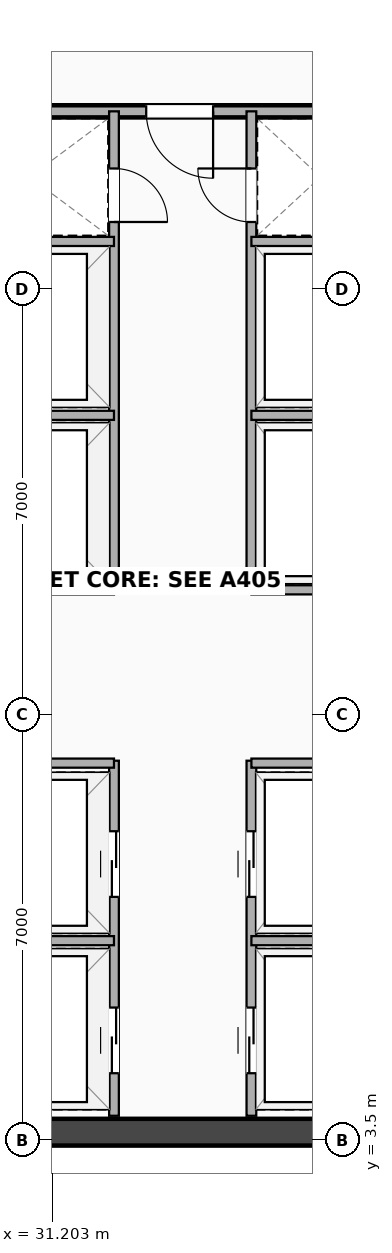
"""IFC4 building model, lengths in metres.
Left out: names, types, materials, properties, quantities, classifications, styles, units other than length and angle.
Written with IfcOpenShell. Run it as: python <this file> out.ifc"""

import sys

from ifc_helpers import new_model, si_unit, direction, frame, frame_2d, origin, place, context, subcontext, project, spatial, rectangle, extrude, element, fill, save


model = new_model("IFC4")
c1 = context("Model", 3, precision=1e-05, world=origin(), true_north=direction((0.0, 1.0)))
c2 = subcontext(c1, "Body", "Model", "MODEL_VIEW")
j1 = project(units=[si_unit("LENGTHUNIT", "METRE"), si_unit("PLANEANGLEUNIT", "RADIAN")], contexts=[c1])
p1 = place(None, origin())
s1 = spatial("IfcSite", under=j1, at=p1, CompositionType="ELEMENT")
p2 = place(p1, origin())
s2 = spatial("IfcBuilding", under=s1, at=p2, CompositionType="ELEMENT")
p3 = place(p2, frame((0.0, 0.0, 68.4)))
s3 = spatial("IfcBuildingStorey", under=s2, at=p3, CompositionType="ELEMENT", Elevation=68.4)
p4 = place(p3, frame((20.3, 3.63, 0.0), z_axis=(0.0, 0.0, 1.0), x_axis=(1.0, 0.0, 0.0)))
e1 = element("IfcWall", 1, at=p4, inside=s3, PredefinedType="SHEAR", context=c2, shape_type="SweptSolid", body=[
    extrude(rectangle(XDim=24.5, YDim=0.44, at=frame_2d((12.25, 0.0))), origin(), (0.0, 0.0, 1.0), 3.22),
])
p5 = place(p3, frame((29.2, 20.42, 0.0), z_axis=(0.0, 0.0, 1.0), x_axis=(1.0, 0.0, 0.0)))
e2 = element("IfcWall", 2, at=p5, inside=s3, PredefinedType="PARTITIONING", context=c2, shape_type="SweptSolid", body=[
    extrude(rectangle(XDim=7.8, YDim=0.2, at=frame_2d((3.9, 0.0))), origin(), (0.0, 0.0, 1.0), 2.51),
])
p6 = place(p5, frame((3.55, 0.0, 0.0)))
e3 = element("IfcOpeningElement", 3, at=p6, cuts=e2, PredefinedType="OPENING", context=c2, shape_type="SweptSolid", body=[
    extrude(rectangle(XDim=1.1, YDim=2.15, at=frame_2d((0.55, 1.075))), frame((0.0, 0.11, 0.0), z_axis=(0.0, -1.0, 0.0), x_axis=(1.0, 0.0, 0.0)), (0.0, 0.0, 1.0), 0.22),
])
p7 = place(p3, frame((32.22, 3.9, 0.0), z_axis=(0.0, 0.0, 1.0), x_axis=(0.0, 1.0, 0.0)))
e4 = element("IfcWall", 4, at=p7, inside=s3, PredefinedType="PARTITIONING", context=c2, shape_type="SweptSolid", body=[
    extrude(rectangle(XDim=5.84, YDim=0.16, at=frame_2d((2.92, 0.0))), origin(), (0.0, 0.0, 1.0), 3.22),
])
p8 = place(p7, frame((1.78, 0.0, 0.0), z_axis=(0.0, 0.0, 1.0), x_axis=(-1.0, 0.0, 0.0)))
e5 = element("IfcOpeningElement", 5, at=p8, cuts=e4, PredefinedType="OPENING", context=c2, shape_type="SweptSolid", body=[
    extrude(rectangle(XDim=1.08, YDim=2.16, at=frame_2d((0.54, 1.08))), frame((0.0, 0.09, 0.0), z_axis=(0.0, -1.0, 0.0), x_axis=(1.0, 0.0, 0.0)), (0.0, 0.0, 1.0), 0.18),
])
p9 = place(p7, frame((4.68, 0.0, 0.0), z_axis=(0.0, 0.0, 1.0), x_axis=(-1.0, 0.0, 0.0)))
e6 = element("IfcOpeningElement", 6, at=p9, cuts=e4, PredefinedType="OPENING", context=c2, shape_type="SweptSolid", body=[
    extrude(rectangle(XDim=1.08, YDim=2.16, at=frame_2d((0.54, 1.08))), frame((0.0, 0.09, 0.0), z_axis=(0.0, -1.0, 0.0), x_axis=(1.0, 0.0, 0.0)), (0.0, 0.0, 1.0), 0.18),
])
p10 = place(p3, frame((34.48, 3.9, 0.0), z_axis=(0.0, 0.0, 1.0), x_axis=(0.0, 1.0, 0.0)))
e7 = element("IfcWall", 7, at=p10, inside=s3, PredefinedType="PARTITIONING", context=c2, shape_type="SweptSolid", body=[
    extrude(rectangle(XDim=5.84, YDim=0.16, at=frame_2d((2.92, 0.0))), origin(), (0.0, 0.0, 1.0), 3.22),
])
p11 = place(p10, frame((0.7, 0.0, 0.0)))
e8 = element("IfcOpeningElement", 8, at=p11, cuts=e7, PredefinedType="OPENING", context=c2, shape_type="SweptSolid", body=[
    extrude(rectangle(XDim=1.08, YDim=2.16, at=frame_2d((0.54, 1.08))), frame((0.0, 0.09, 0.0), z_axis=(0.0, -1.0, 0.0), x_axis=(1.0, 0.0, 0.0)), (0.0, 0.0, 1.0), 0.18),
])
p12 = place(p10, frame((3.6, 0.0, 0.0)))
e9 = element("IfcOpeningElement", 9, at=p12, cuts=e7, PredefinedType="OPENING", context=c2, shape_type="SweptSolid", body=[
    extrude(rectangle(XDim=1.08, YDim=2.16, at=frame_2d((0.54, 1.08))), frame((0.0, 0.09, 0.0), z_axis=(0.0, -1.0, 0.0), x_axis=(1.0, 0.0, 0.0)), (0.0, 0.0, 1.0), 0.18),
])
p13 = place(p3, frame((29.45, 6.78, 0.0), z_axis=(0.0, 0.0, 1.0), x_axis=(1.0, 0.0, 0.0)))
e10 = element("IfcWall", 10, at=p13, inside=s3, PredefinedType="PARTITIONING", context=c2, shape_type="SweptSolid", body=[
    extrude(rectangle(XDim=2.77, YDim=0.15, at=frame_2d((1.385, 0.0))), origin(), (0.0, 0.0, 1.0), 3.22),
])
p14 = place(p3, frame((34.48, 6.78, 0.0), z_axis=(0.0, 0.0, 1.0), x_axis=(1.0, 0.0, 0.0)))
e11 = element("IfcWall", 11, at=p14, inside=s3, PredefinedType="PARTITIONING", context=c2, shape_type="SweptSolid", body=[
    extrude(rectangle(XDim=2.27, YDim=0.15, at=frame_2d((1.135, 0.0))), origin(), (0.0, 0.0, 1.0), 3.22),
])
p15 = place(p3, frame((29.45, 9.7, 0.0), z_axis=(0.0, 0.0, 1.0), x_axis=(1.0, 0.0, 0.0)))
e12 = element("IfcWall", 12, at=p15, inside=s3, PredefinedType="PARTITIONING", context=c2, shape_type="SweptSolid", body=[
    extrude(rectangle(XDim=2.77, YDim=0.15, at=frame_2d((1.385, 0.0))), origin(), (0.0, 0.0, 1.0), 3.22),
])
p16 = place(p3, frame((34.48, 9.7, 0.0), z_axis=(0.0, 0.0, 1.0), x_axis=(1.0, 0.0, 0.0)))
e13 = element("IfcWall", 13, at=p16, inside=s3, PredefinedType="PARTITIONING", context=c2, shape_type="SweptSolid", body=[
    extrude(rectangle(XDim=2.27, YDim=0.15, at=frame_2d((1.135, 0.0))), origin(), (0.0, 0.0, 1.0), 3.22),
])
p17 = place(p3, frame((32.22, 12.5, 0.0), z_axis=(0.0, 0.0, 1.0), x_axis=(0.0, 1.0, 0.0)))
e14 = element("IfcWall", 14, at=p17, inside=s3, PredefinedType="PARTITIONING", context=c2, shape_type="SweptSolid", body=[
    extrude(rectangle(XDim=7.92, YDim=0.16, at=frame_2d((3.96, 0.0))), origin(), (0.0, 0.0, 1.0), 2.51),
])
p18 = place(p17, frame((6.1, 0.0, 0.0)))
e15 = element("IfcOpeningElement", 15, at=p18, cuts=e14, PredefinedType="OPENING", context=c2, shape_type="SweptSolid", body=[
    extrude(rectangle(XDim=0.88, YDim=2.08, at=frame_2d((0.44, 1.04))), frame((0.0, 0.09, 0.0), z_axis=(0.0, -1.0, 0.0), x_axis=(1.0, 0.0, 0.0)), (0.0, 0.0, 1.0), 0.18),
])
p19 = place(p3, frame((34.48, 12.5, 0.0), z_axis=(0.0, 0.0, 1.0), x_axis=(0.0, 1.0, 0.0)))
e16 = element("IfcWall", 16, at=p19, inside=s3, PredefinedType="PARTITIONING", context=c2, shape_type="SweptSolid", body=[
    extrude(rectangle(XDim=7.92, YDim=0.16, at=frame_2d((3.96, 0.0))), origin(), (0.0, 0.0, 1.0), 2.51),
])
p20 = place(p19, frame((6.98, 0.0, 0.0), z_axis=(0.0, 0.0, 1.0), x_axis=(-1.0, 0.0, 0.0)))
e17 = element("IfcOpeningElement", 17, at=p20, cuts=e16, PredefinedType="OPENING", context=c2, shape_type="SweptSolid", body=[
    extrude(rectangle(XDim=0.88, YDim=2.08, at=frame_2d((0.44, 1.04))), frame((0.0, 0.09, 0.0), z_axis=(0.0, -1.0, 0.0), x_axis=(1.0, 0.0, 0.0)), (0.0, 0.0, 1.0), 0.18),
])
p21 = place(p3, frame((29.45, 12.55, 0.0), z_axis=(0.0, 0.0, 1.0), x_axis=(1.0, 0.0, 0.0)))
e18 = element("IfcWall", 18, at=p21, inside=s3, PredefinedType="PARTITIONING", context=c2, shape_type="SweptSolid", body=[
    extrude(rectangle(XDim=2.77, YDim=0.15, at=frame_2d((1.385, 0.0))), origin(), (0.0, 0.0, 1.0), 3.22),
])
p22 = place(p3, frame((34.48, 12.55, 0.0), z_axis=(0.0, 0.0, 1.0), x_axis=(1.0, 0.0, 0.0)))
e19 = element("IfcWall", 19, at=p22, inside=s3, PredefinedType="PARTITIONING", context=c2, shape_type="SweptSolid", body=[
    extrude(rectangle(XDim=2.27, YDim=0.15, at=frame_2d((1.135, 0.0))), origin(), (0.0, 0.0, 1.0), 3.22),
])
p23 = place(p3, frame((29.45, 15.42, 0.0), z_axis=(0.0, 0.0, 1.0), x_axis=(1.0, 0.0, 0.0)))
e20 = element("IfcWall", 20, at=p23, inside=s3, PredefinedType="PARTITIONING", context=c2, shape_type="SweptSolid", body=[
    extrude(rectangle(XDim=2.77, YDim=0.15, at=frame_2d((1.385, 0.0))), origin(), (0.0, 0.0, 1.0), 3.22),
])
p24 = place(p3, frame((34.48, 15.42, 0.0), z_axis=(0.0, 0.0, 1.0), x_axis=(1.0, 0.0, 0.0)))
e21 = element("IfcWall", 21, at=p24, inside=s3, PredefinedType="PARTITIONING", context=c2, shape_type="SweptSolid", body=[
    extrude(rectangle(XDim=2.27, YDim=0.15, at=frame_2d((1.135, 0.0))), origin(), (0.0, 0.0, 1.0), 3.22),
])
p25 = place(p3, frame((29.45, 18.28, 0.0), z_axis=(0.0, 0.0, 1.0), x_axis=(1.0, 0.0, 0.0)))
e22 = element("IfcWall", 22, at=p25, inside=s3, PredefinedType="PARTITIONING", context=c2, shape_type="SweptSolid", body=[
    extrude(rectangle(XDim=2.77, YDim=0.15, at=frame_2d((1.385, 0.0))), origin(), (0.0, 0.0, 1.0), 3.22),
])
p26 = place(p3, frame((34.48, 18.28, 0.0), z_axis=(0.0, 0.0, 1.0), x_axis=(1.0, 0.0, 0.0)))
e23 = element("IfcWall", 23, at=p26, inside=s3, PredefinedType="PARTITIONING", context=c2, shape_type="SweptSolid", body=[
    extrude(rectangle(XDim=2.27, YDim=0.15, at=frame_2d((1.135, 0.0))), origin(), (0.0, 0.0, 1.0), 3.22),
])
p27 = place(p6, origin())
e24 = element("IfcDoor", 24, at=p27, inside=s3, OperationType="SINGLE_SWING_RIGHT", PredefinedType="DOOR", context=c2, shape_type="SweptSolid", body=[
    extrude(rectangle(XDim=1.1, YDim=2.15, at=frame_2d((0.55, 1.075))), frame((0.0, 0.025, 0.0), z_axis=(0.0, -1.0, 0.0), x_axis=(1.0, 0.0, 0.0)), (0.0, 0.0, 1.0), 0.05),
])
fill(e3, e24)
p28 = place(p8, origin())
e25 = element("IfcDoor", 25, at=p28, inside=s3, OperationType="DOUBLE_DOOR_SLIDING", PredefinedType="DOOR", context=c2, shape_type="SweptSolid", body=[
    extrude(rectangle(XDim=1.08, YDim=2.16, at=frame_2d((0.54, 1.08))), frame((0.0, 0.025, 0.0), z_axis=(0.0, -1.0, 0.0), x_axis=(1.0, 0.0, 0.0)), (0.0, 0.0, 1.0), 0.05),
])
fill(e5, e25)
p29 = place(p9, origin())
e26 = element("IfcDoor", 26, at=p29, inside=s3, OperationType="DOUBLE_DOOR_SLIDING", PredefinedType="DOOR", context=c2, shape_type="SweptSolid", body=[
    extrude(rectangle(XDim=1.08, YDim=2.16, at=frame_2d((0.54, 1.08))), frame((0.0, 0.025, 0.0), z_axis=(0.0, -1.0, 0.0), x_axis=(1.0, 0.0, 0.0)), (0.0, 0.0, 1.0), 0.05),
])
fill(e6, e26)
p30 = place(p11, origin())
e27 = element("IfcDoor", 27, at=p30, inside=s3, OperationType="DOUBLE_DOOR_SLIDING", PredefinedType="DOOR", context=c2, shape_type="SweptSolid", body=[
    extrude(rectangle(XDim=1.08, YDim=2.16, at=frame_2d((0.54, 1.08))), frame((0.0, 0.025, 0.0), z_axis=(0.0, -1.0, 0.0), x_axis=(1.0, 0.0, 0.0)), (0.0, 0.0, 1.0), 0.05),
])
fill(e8, e27)
p31 = place(p12, origin())
e28 = element("IfcDoor", 28, at=p31, inside=s3, OperationType="DOUBLE_DOOR_SLIDING", PredefinedType="DOOR", context=c2, shape_type="SweptSolid", body=[
    extrude(rectangle(XDim=1.08, YDim=2.16, at=frame_2d((0.54, 1.08))), frame((0.0, 0.025, 0.0), z_axis=(0.0, -1.0, 0.0), x_axis=(1.0, 0.0, 0.0)), (0.0, 0.0, 1.0), 0.05),
])
fill(e9, e28)
p32 = place(p18, origin())
e29 = element("IfcDoor", 29, at=p32, inside=s3, OperationType="SINGLE_SWING_LEFT", PredefinedType="DOOR", context=c2, shape_type="SweptSolid", body=[
    extrude(rectangle(XDim=0.88, YDim=2.08, at=frame_2d((0.44, 1.04))), frame((0.0, 0.025, 0.0), z_axis=(0.0, -1.0, 0.0), x_axis=(1.0, 0.0, 0.0)), (0.0, 0.0, 1.0), 0.05),
])
fill(e15, e29)
p33 = place(p20, origin())
e30 = element("IfcDoor", 30, at=p33, inside=s3, OperationType="SINGLE_SWING_RIGHT", PredefinedType="DOOR", context=c2, shape_type="SweptSolid", body=[
    extrude(rectangle(XDim=0.88, YDim=2.08, at=frame_2d((0.44, 1.04))), frame((0.0, 0.025, 0.0), z_axis=(0.0, -1.0, 0.0), x_axis=(1.0, 0.0, 0.0)), (0.0, 0.0, 1.0), 0.05),
])
fill(e17, e30)
save(model, sys.argv[1])
